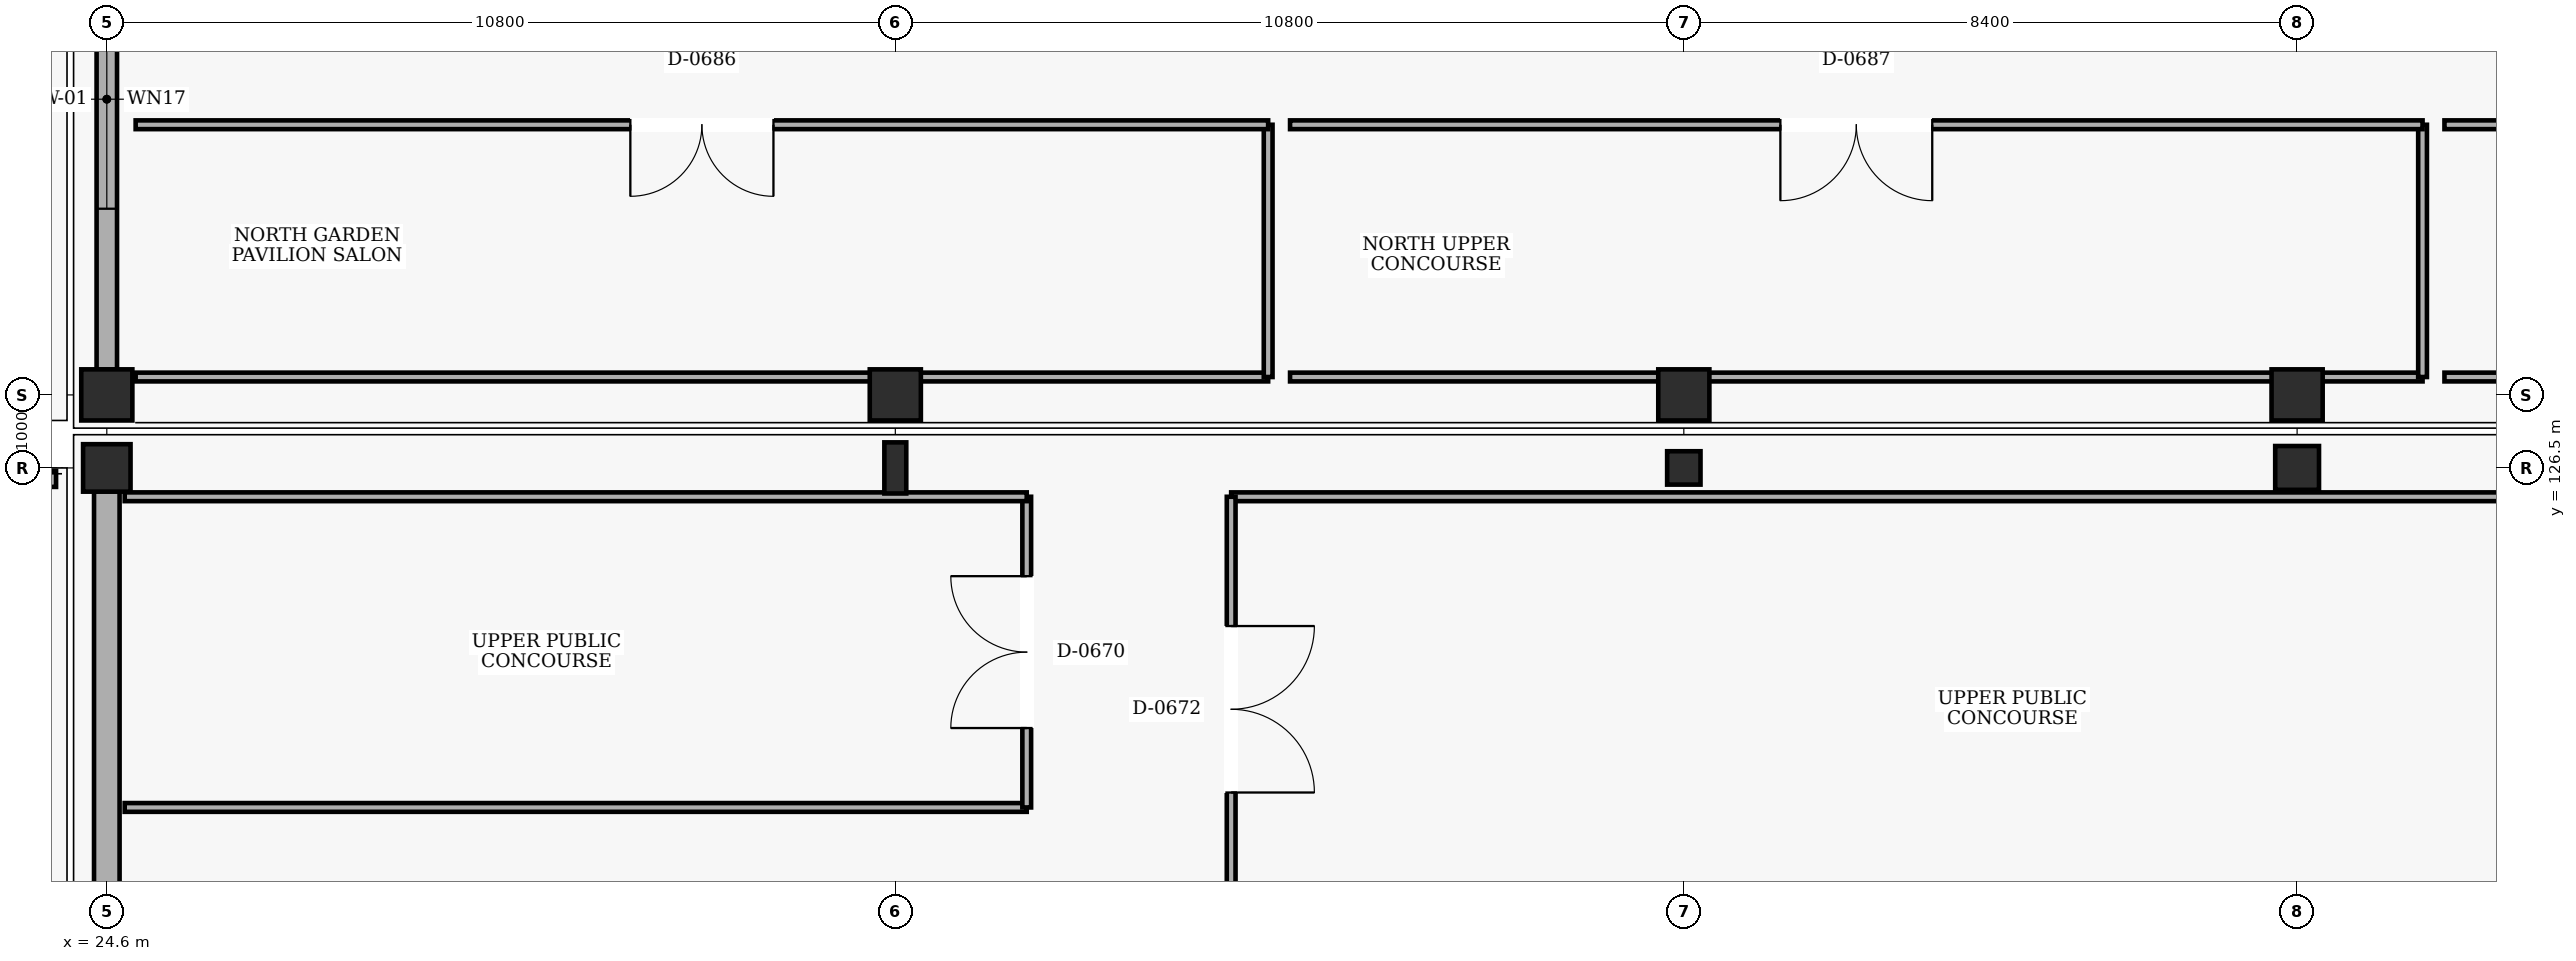
"""IFC4 building model, lengths in metres.
Left out: names, types, materials, properties, quantities, classifications, styles, units other than length and angle.
Written with IfcOpenShell. Run it as: python <this file> out.ifc"""

import sys

from ifc_helpers import new_model, si_unit, direction, frame, frame_2d, origin, origin_2d, place, context, subcontext, project, spatial, rectangle, hollow_circle, i_section, extrude, element, fill, save


model = new_model("IFC4")
c1 = context("Model", 3, precision=1e-05, world=origin(), true_north=direction((0.0, 1.0)))
c2 = subcontext(c1, "Body", "Model", "MODEL_VIEW")
j1 = project(units=[si_unit("LENGTHUNIT", "METRE"), si_unit("PLANEANGLEUNIT", "RADIAN")], contexts=[c1])
p1 = place(None, origin())
s1 = spatial("IfcSite", under=j1, at=p1, CompositionType="ELEMENT")
p2 = place(p1, origin())
s2 = spatial("IfcBuilding", under=s1, at=p2, CompositionType="ELEMENT")
p3 = place(p2, frame((0.0, 0.0, 15.0)))
s3 = spatial("IfcBuildingStorey", under=s2, at=p3, CompositionType="ELEMENT", Elevation=15.0)
p4 = place(p3, frame((24.6, 126.5, 0.0), z_axis=(0.0, 0.0, 1.0), x_axis=(1.0, 0.0, 0.0)))
e1 = element("IfcColumn", 1, at=p4, inside=s3, PredefinedType="COLUMN", context=c2, shape_type="SweptSolid", body=[
    extrude(rectangle(XDim=0.65, YDim=0.65, at=origin_2d()), origin(), (0.0, 0.0, 1.0), 4.8),
])
p5 = place(p3, frame((24.6, 127.5, 0.0), z_axis=(0.0, 0.0, 1.0), x_axis=(1.0, 0.0, 0.0)))
e2 = element("IfcColumn", 2, at=p5, inside=s3, PredefinedType="COLUMN", context=c2, shape_type="SweptSolid", body=[
    extrude(rectangle(XDim=0.7, YDim=0.7, at=origin_2d()), origin(), (0.0, 0.0, 1.0), 4.8),
])
p6 = place(p3, frame((35.4, 126.5, 0.0), z_axis=(0.0, 0.0, 1.0), x_axis=(1.0, 0.0, 0.0)))
e3 = element("IfcColumn", 3, at=p6, inside=s3, PredefinedType="COLUMN", context=c2, shape_type="SweptSolid", body=[
    extrude(i_section(OverallWidth=0.3, OverallDepth=0.7, WebThickness=0.017, FlangeThickness=0.032, at=origin_2d()), origin(), (0.0, 0.0, 1.0), 4.8),
])
p7 = place(p3, frame((35.4, 127.5, 0.0), z_axis=(0.0, 0.0, 1.0), x_axis=(1.0, 0.0, 0.0)))
e4 = element("IfcColumn", 4, at=p7, inside=s3, PredefinedType="COLUMN", context=c2, shape_type="SweptSolid", body=[
    extrude(rectangle(XDim=0.7, YDim=0.7, at=origin_2d()), origin(), (0.0, 0.0, 1.0), 4.8),
])
p8 = place(p3, frame((46.2, 126.5, 0.0), z_axis=(0.0, 0.0, 1.0), x_axis=(1.0, 0.0, 0.0)))
e5 = element("IfcColumn", 5, at=p8, inside=s3, PredefinedType="COLUMN", context=c2, shape_type="SweptSolid", body=[
    extrude(hollow_circle(Radius=0.229, WallThickness=0.02, at=origin_2d()), origin(), (0.0, 0.0, 1.0), 4.8),
])
p9 = place(p3, frame((46.2, 127.5, 0.0), z_axis=(0.0, 0.0, 1.0), x_axis=(1.0, 0.0, 0.0)))
e6 = element("IfcColumn", 6, at=p9, inside=s3, PredefinedType="COLUMN", context=c2, shape_type="SweptSolid", body=[
    extrude(rectangle(XDim=0.7, YDim=0.7, at=origin_2d()), origin(), (0.0, 0.0, 1.0), 4.8),
])
p10 = place(p3, frame((54.6, 126.5, 0.0), z_axis=(0.0, 0.0, 1.0), x_axis=(1.0, 0.0, 0.0)))
e7 = element("IfcColumn", 7, at=p10, inside=s3, PredefinedType="COLUMN", context=c2, shape_type="SweptSolid", body=[
    extrude(rectangle(XDim=0.6, YDim=0.6, at=origin_2d()), origin(), (0.0, 0.0, 1.0), 4.8),
])
p11 = place(p3, frame((54.6, 127.5, 0.0), z_axis=(0.0, 0.0, 1.0), x_axis=(1.0, 0.0, 0.0)))
e8 = element("IfcColumn", 8, at=p11, inside=s3, PredefinedType="COLUMN", context=c2, shape_type="SweptSolid", body=[
    extrude(rectangle(XDim=0.7, YDim=0.7, at=origin_2d()), origin(), (0.0, 0.0, 1.0), 4.8),
])
p12 = place(p3, frame((24.6, 112.195, 0.0), z_axis=(0.0, 0.0, 1.0), x_axis=(0.0, 1.0, 0.0)))
e9 = element("IfcWall", 9, at=p12, inside=s3, PredefinedType="SOLIDWALL", context=c2, shape_type="SweptSolid", body=[
    extrude(rectangle(XDim=13.985, YDim=0.35, at=frame_2d((6.992, 0.0))), origin(), (0.0, 0.0, 1.0), 3.58),
])
p13 = place(p12, frame((6.4, 0.0, 0.0)))
e10 = element("IfcOpeningElement", 10, at=p13, cuts=e9, PredefinedType="OPENING", context=c2, shape_type="SweptSolid", body=[
    extrude(rectangle(XDim=1.8, YDim=2.2, at=frame_2d((0.9, 1.1))), frame((0.0, 0.185, 0.0), z_axis=(0.0, -1.0, 0.0), x_axis=(1.0, 0.0, 0.0)), (0.0, 0.0, 1.0), 0.37),
])
p14 = place(p3, frame((24.6, 127.845, 0.0), z_axis=(0.0, 0.0, 1.0), x_axis=(0.0, 1.0, 0.0)))
e11 = element("IfcWall", 11, at=p14, inside=s3, PredefinedType="SOLIDWALL", context=c2, shape_type="SweptSolid", body=[
    extrude(rectangle(XDim=7.41, YDim=0.28, at=frame_2d((3.705, 0.0))), origin(), (0.0, 0.0, 1.0), 3.82),
])
p15 = place(p14, frame((2.205, 0.0, 0.9)))
e12 = element("IfcOpeningElement", 12, at=p15, cuts=e11, PredefinedType="OPENING", context=c2, shape_type="SweptSolid", body=[
    extrude(rectangle(XDim=3.0, YDim=2.1, at=frame_2d((1.5, 1.05))), frame((0.0, 0.15, 0.0), z_axis=(0.0, -1.0, 0.0), x_axis=(1.0, 0.0, 0.0)), (0.0, 0.0, 1.0), 0.3),
])
p16 = place(p3, frame((23.905, 126.35, 0.0), z_axis=(0.0, 0.0, 1.0), x_axis=(-1.0, 0.0, 0.0)))
e13 = element("IfcWall", 13, at=p16, inside=s3, PredefinedType="PARAPET", context=c2, shape_type="SweptSolid", body=[
    extrude(rectangle(XDim=9.877, YDim=0.22, at=frame_2d((4.939, 0.0))), origin(), (0.0, 0.0, 1.0), 1.15),
])
p17 = place(p3, frame((24.845, 121.85, 0.0), z_axis=(0.0, 0.0, 1.0), x_axis=(1.0, 0.0, 0.0)))
e14 = element("IfcWall", 14, at=p17, inside=s3, PredefinedType="PARTITIONING", context=c2, shape_type="SweptSolid", body=[
    extrude(rectangle(XDim=12.355, YDim=0.12, at=frame_2d((6.177, 0.0))), origin(), (0.0, 0.0, 1.0), 4.5),
])
p18 = place(p3, frame((37.2, 121.85, 0.0), z_axis=(0.0, 0.0, 1.0), x_axis=(0.0, 1.0, 0.0)))
e15 = element("IfcWall", 15, at=p18, inside=s3, PredefinedType="PARTITIONING", context=c2, shape_type="SweptSolid", body=[
    extrude(rectangle(XDim=4.255, YDim=0.12, at=frame_2d((2.127, 0.0))), origin(), (0.0, 0.0, 1.0), 4.5),
])
p19 = place(p18, frame((1.088, 0.0, 0.0)))
e16 = element("IfcOpeningElement", 16, at=p19, cuts=e15, PredefinedType="OPENING", context=c2, shape_type="SweptSolid", body=[
    extrude(rectangle(XDim=2.08, YDim=2.35, at=frame_2d((1.04, 1.175))), frame((0.0, 0.07, 0.0), z_axis=(0.0, -1.0, 0.0), x_axis=(1.0, 0.0, 0.0)), (0.0, 0.0, 1.0), 0.14),
])
p20 = place(p3, frame((37.2, 126.105, 0.0), z_axis=(0.0, 0.0, 1.0), x_axis=(-1.0, 0.0, 0.0)))
e17 = element("IfcWall", 17, at=p20, inside=s3, PredefinedType="PARTITIONING", context=c2, shape_type="SweptSolid", body=[
    extrude(rectangle(XDim=12.355, YDim=0.12, at=frame_2d((6.177, 0.0))), origin(), (0.0, 0.0, 1.0), 3.68),
])
p21 = place(p3, frame((60.6, 126.105, 0.0), z_axis=(0.0, 0.0, 1.0), x_axis=(-1.0, 0.0, 0.0)))
e18 = element("IfcWall", 18, at=p21, inside=s3, PredefinedType="PARTITIONING", context=c2, shape_type="SweptSolid", body=[
    extrude(rectangle(XDim=20.6, YDim=0.12, at=frame_2d((10.3, 0.0))), origin(), (0.0, 0.0, 1.0), 3.68),
])
p22 = place(p3, frame((40.0, 126.105, 0.0), z_axis=(0.0, 0.0, 1.0), x_axis=(0.0, -1.0, 0.0)))
e19 = element("IfcWall", 19, at=p22, inside=s3, PredefinedType="PARTITIONING", context=c2, shape_type="SweptSolid", body=[
    extrude(rectangle(XDim=5.821, YDim=0.12, at=frame_2d((2.911, 0.0))), origin(), (0.0, 0.0, 1.0), 4.5),
])
p23 = place(p22, frame((1.771, 0.0, 0.0)))
e20 = element("IfcOpeningElement", 20, at=p23, cuts=e19, PredefinedType="OPENING", context=c2, shape_type="SweptSolid", body=[
    extrude(rectangle(XDim=2.28, YDim=2.4, at=frame_2d((1.14, 1.2))), frame((0.0, 0.07, 0.0), z_axis=(0.0, -1.0, 0.0), x_axis=(1.0, 0.0, 0.0)), (0.0, 0.0, 1.0), 0.14),
])
p24 = place(p3, frame((24.995, 127.745, 0.0), z_axis=(0.0, 0.0, 1.0), x_axis=(1.0, 0.0, 0.0)))
e21 = element("IfcWall", 21, at=p24, inside=s3, PredefinedType="PARTITIONING", context=c2, shape_type="SweptSolid", body=[
    extrude(rectangle(XDim=15.511, YDim=0.12, at=frame_2d((7.756, 0.0))), origin(), (0.0, 0.0, 1.0), 3.62),
])
p25 = place(p3, frame((40.507, 127.745, 0.0), z_axis=(0.0, 0.0, 1.0), x_axis=(0.0, 1.0, 0.0)))
e22 = element("IfcWall", 22, at=p25, inside=s3, PredefinedType="PARTITIONING", context=c2, shape_type="SweptSolid", body=[
    extrude(rectangle(XDim=3.455, YDim=0.12, at=frame_2d((1.728, 0.0))), origin(), (0.0, 0.0, 1.0), 4.5),
])
p26 = place(p3, frame((40.507, 131.2, 0.0), z_axis=(0.0, 0.0, 1.0), x_axis=(-1.0, 0.0, 0.0)))
e23 = element("IfcWall", 23, at=p26, inside=s3, PredefinedType="PARTITIONING", context=c2, shape_type="SweptSolid", body=[
    extrude(rectangle(XDim=15.511, YDim=0.12, at=frame_2d((7.756, 0.0))), origin(), (0.0, 0.0, 1.0), 4.5),
])
p27 = place(p26, frame((6.776, 0.0, 0.0)))
e24 = element("IfcOpeningElement", 24, at=p27, cuts=e23, PredefinedType="OPENING", context=c2, shape_type="SweptSolid", body=[
    extrude(rectangle(XDim=1.96, YDim=2.3, at=frame_2d((0.98, 1.15))), frame((0.0, 0.07, 0.0), z_axis=(0.0, -1.0, 0.0), x_axis=(1.0, 0.0, 0.0)), (0.0, 0.0, 1.0), 0.14),
])
p28 = place(p3, frame((40.807, 127.745, 0.0), z_axis=(0.0, 0.0, 1.0), x_axis=(1.0, 0.0, 0.0)))
e25 = element("IfcWall", 25, at=p28, inside=s3, PredefinedType="PARTITIONING", context=c2, shape_type="SweptSolid", body=[
    extrude(rectangle(XDim=15.512, YDim=0.12, at=frame_2d((7.756, 0.0))), origin(), (0.0, 0.0, 1.0), 3.62),
])
p29 = place(p3, frame((56.318, 127.745, 0.0), z_axis=(0.0, 0.0, 1.0), x_axis=(0.0, 1.0, 0.0)))
e26 = element("IfcWall", 26, at=p29, inside=s3, PredefinedType="PARTITIONING", context=c2, shape_type="SweptSolid", body=[
    extrude(rectangle(XDim=3.455, YDim=0.12, at=frame_2d((1.728, 0.0))), origin(), (0.0, 0.0, 1.0), 4.5),
])
p30 = place(p3, frame((56.318, 131.2, 0.0), z_axis=(0.0, 0.0, 1.0), x_axis=(-1.0, 0.0, 0.0)))
e27 = element("IfcWall", 27, at=p30, inside=s3, PredefinedType="PARTITIONING", context=c2, shape_type="SweptSolid", body=[
    extrude(rectangle(XDim=15.512, YDim=0.12, at=frame_2d((7.756, 0.0))), origin(), (0.0, 0.0, 1.0), 4.5),
])
p31 = place(p30, frame((6.716, 0.0, 0.0)))
e28 = element("IfcOpeningElement", 28, at=p31, cuts=e27, PredefinedType="OPENING", context=c2, shape_type="SweptSolid", body=[
    extrude(rectangle(XDim=2.08, YDim=2.35, at=frame_2d((1.04, 1.175))), frame((0.0, 0.07, 0.0), z_axis=(0.0, -1.0, 0.0), x_axis=(1.0, 0.0, 0.0)), (0.0, 0.0, 1.0), 0.14),
])
p32 = place(p3, frame((56.618, 127.745, 0.0), z_axis=(0.0, 0.0, 1.0), x_axis=(1.0, 0.0, 0.0)))
e29 = element("IfcWall", 29, at=p32, inside=s3, PredefinedType="PARTITIONING", context=c2, shape_type="SweptSolid", body=[
    extrude(rectangle(XDim=15.511, YDim=0.12, at=frame_2d((7.756, 0.0))), origin(), (0.0, 0.0, 1.0), 3.78),
])
p33 = place(p3, frame((72.13, 131.2, 0.0), z_axis=(0.0, 0.0, 1.0), x_axis=(-1.0, 0.0, 0.0)))
e30 = element("IfcWall", 30, at=p33, inside=s3, PredefinedType="PARTITIONING", context=c2, shape_type="SweptSolid", body=[
    extrude(rectangle(XDim=15.511, YDim=0.12, at=frame_2d((7.756, 0.0))), origin(), (0.0, 0.0, 1.0), 4.5),
])
p34 = place(p33, frame((6.676, 0.0, 0.0)))
e31 = element("IfcOpeningElement", 31, at=p34, cuts=e30, PredefinedType="OPENING", context=c2, shape_type="SweptSolid", body=[
    extrude(rectangle(XDim=2.16, YDim=2.35, at=frame_2d((1.08, 1.175))), frame((0.0, 0.07, 0.0), z_axis=(0.0, -1.0, 0.0), x_axis=(1.0, 0.0, 0.0)), (0.0, 0.0, 1.0), 0.14),
])
p35 = place(p15, origin())
e32 = element("IfcWindow", 32, at=p35, inside=s3, PartitioningType="SINGLE_PANEL", PredefinedType="WINDOW", context=c2, shape_type="SweptSolid", body=[
    extrude(rectangle(XDim=3.0, YDim=2.1, at=frame_2d((1.5, 1.05))), frame((0.0, 0.03, 0.0), z_axis=(0.0, -1.0, 0.0), x_axis=(1.0, 0.0, 0.0)), (0.0, 0.0, 1.0), 0.06),
])
fill(e12, e32)
p36 = place(p19, origin())
e33 = element("IfcDoor", 33, at=p36, inside=s3, OperationType="DOUBLE_DOOR_SINGLE_SWING", PredefinedType="DOOR", context=c2, shape_type="SweptSolid", body=[
    extrude(rectangle(XDim=2.08, YDim=2.35, at=frame_2d((1.04, 1.175))), frame((0.0, 0.025, 0.0), z_axis=(0.0, -1.0, 0.0), x_axis=(1.0, 0.0, 0.0)), (0.0, 0.0, 1.0), 0.05),
])
fill(e16, e33)
p37 = place(p23, origin())
e34 = element("IfcDoor", 34, at=p37, inside=s3, OperationType="DOUBLE_DOOR_SINGLE_SWING", PredefinedType="DOOR", context=c2, shape_type="SweptSolid", body=[
    extrude(rectangle(XDim=2.28, YDim=2.4, at=frame_2d((1.14, 1.2))), frame((0.0, 0.025, 0.0), z_axis=(0.0, -1.0, 0.0), x_axis=(1.0, 0.0, 0.0)), (0.0, 0.0, 1.0), 0.05),
])
fill(e20, e34)
p38 = place(p27, origin())
e35 = element("IfcDoor", 35, at=p38, inside=s3, OperationType="DOUBLE_DOOR_SINGLE_SWING", PredefinedType="DOOR", context=c2, shape_type="SweptSolid", body=[
    extrude(rectangle(XDim=1.96, YDim=2.3, at=frame_2d((0.98, 1.15))), frame((0.0, 0.025, 0.0), z_axis=(0.0, -1.0, 0.0), x_axis=(1.0, 0.0, 0.0)), (0.0, 0.0, 1.0), 0.05),
])
fill(e24, e35)
p39 = place(p31, origin())
e36 = element("IfcDoor", 36, at=p39, inside=s3, OperationType="DOUBLE_DOOR_SINGLE_SWING", PredefinedType="DOOR", context=c2, shape_type="SweptSolid", body=[
    extrude(rectangle(XDim=2.08, YDim=2.35, at=frame_2d((1.04, 1.175))), frame((0.0, 0.025, 0.0), z_axis=(0.0, -1.0, 0.0), x_axis=(1.0, 0.0, 0.0)), (0.0, 0.0, 1.0), 0.05),
])
fill(e28, e36)
save(model, sys.argv[1])
